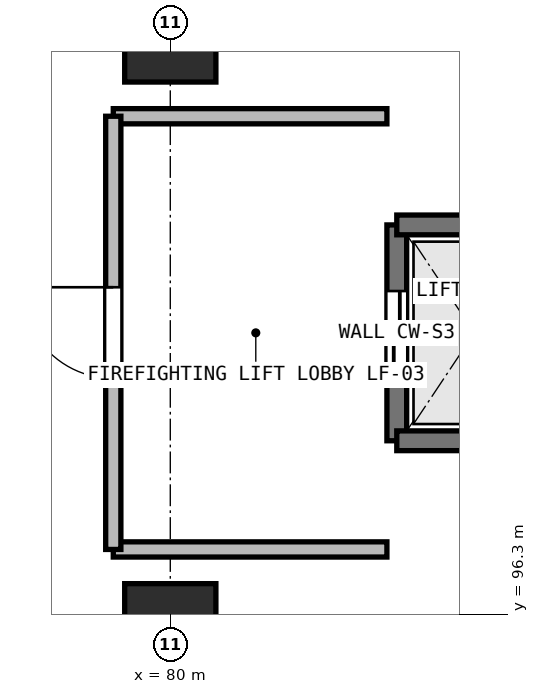
"""IFC4 building model, lengths in metres.
Left out: names, types, materials, properties, quantities, classifications, styles, units other than length and angle.
Written with IfcOpenShell. Run it as: python <this file> out.ifc"""

import sys

from ifc_helpers import new_model, si_unit, direction, frame, frame_2d, origin, origin_2d, place, context, subcontext, project, spatial, rectangle, extrude, element, fill, save


model = new_model("IFC4")
c1 = context("Model", 3, precision=1e-05, world=origin(), true_north=direction((0.0, 1.0)))
c2 = subcontext(c1, "Body", "Model", "MODEL_VIEW")
j1 = project(units=[si_unit("LENGTHUNIT", "METRE"), si_unit("PLANEANGLEUNIT", "RADIAN")], contexts=[c1])
p1 = place(None, origin())
s1 = spatial("IfcSite", under=j1, at=p1, CompositionType="ELEMENT")
p2 = place(p1, origin())
s2 = spatial("IfcBuilding", under=s1, at=p2, CompositionType="ELEMENT")
p3 = place(p2, origin())
s3 = spatial("IfcBuildingStorey", under=s2, at=p3, CompositionType="ELEMENT", Elevation=0.0)
for number, where, z_axis, x_axis in (
    (1, (80.0, 96.0, 0.0), (0.0, 0.0, 1.0), (1.0, 0.0, 0.0)),
    (2, (80.0, 104.0, 0.0), (0.0, 0.0, 1.0), (1.0, 0.0, 0.0)),
):
    element("IfcColumn", number, at=place(p3, frame(where, z_axis=z_axis, x_axis=x_axis)), inside=s3, PredefinedType="COLUMN", context=c2, shape_type="SweptSolid", body=[
        extrude(rectangle(XDim=1.2, YDim=1.4, at=origin_2d()), origin(), (0.0, 0.0, 1.0), 5.4),
    ])
p4 = place(p3, frame((82.98, 98.58, 0.0), z_axis=(0.0, 0.0, 1.0), x_axis=(0.0, 1.0, 0.0)))
e3 = element("IfcWall", 3, at=p4, inside=s3, PredefinedType="SHEAR", context=c2, shape_type="SweptSolid", body=[
    extrude(rectangle(XDim=2.84, YDim=0.26, at=frame_2d((1.42, 0.0))), origin(), (0.0, 0.0, 1.0), 5.08),
])
p5 = place(p4, frame((0.87, 0.0, 0.0)))
e4 = element("IfcOpeningElement", 4, at=p5, cuts=e3, PredefinedType="OPENING", context=c2, shape_type="SweptSolid", body=[
    extrude(rectangle(XDim=1.1, YDim=2.15, at=frame_2d((0.55, 1.075))), frame((0.0, 0.14, 0.0), z_axis=(0.0, -1.0, 0.0), x_axis=(1.0, 0.0, 0.0)), (0.0, 0.0, 1.0), 0.28),
])
for number, where, z_axis, x_axis in (
    (5, (82.98, 101.42, 0.0), (0.0, 0.0, 1.0), (1.0, 0.0, 0.0)),
    (6, (85.02, 98.58, 0.0), (0.0, 0.0, 1.0), (-1.0, 0.0, 0.0)),
):
    element("IfcWall", number, at=place(p3, frame(where, z_axis=z_axis, x_axis=x_axis)), inside=s3, PredefinedType="SHEAR", context=c2, shape_type="SweptSolid", body=[
        extrude(rectangle(XDim=2.04, YDim=0.26, at=frame_2d((1.02, 0.0))), origin(), (0.0, 0.0, 1.0), 5.08),
    ])
for number, where, z_axis, x_axis in (
    (7, (79.25, 102.85, 0.0), (0.0, 0.0, 1.0), (1.0, 0.0, 0.0)),
    (8, (82.85, 97.15, 0.0), (0.0, 0.0, 1.0), (-1.0, 0.0, 0.0)),
):
    element("IfcWall", number, at=place(p3, frame(where, z_axis=z_axis, x_axis=x_axis)), inside=s3, PredefinedType="PARTITIONING", context=c2, shape_type="SweptSolid", body=[
        extrude(rectangle(XDim=3.6, YDim=0.2, at=frame_2d((1.8, 0.0))), origin(), (0.0, 0.0, 1.0), 5.08),
    ])
p6 = place(p3, frame((79.25, 97.15, 0.0), z_axis=(0.0, 0.0, 1.0), x_axis=(0.0, 1.0, 0.0)))
e9 = element("IfcWall", 9, at=p6, inside=s3, PredefinedType="PARTITIONING", context=c2, shape_type="SweptSolid", body=[
    extrude(rectangle(XDim=5.7, YDim=0.2, at=frame_2d((2.85, 0.0))), origin(), (0.0, 0.0, 1.0), 4.05),
])
p7 = place(p6, frame((2.25, 0.0, 0.0)))
e10 = element("IfcOpeningElement", 10, at=p7, cuts=e9, PredefinedType="OPENING", context=c2, shape_type="SweptSolid", body=[
    extrude(rectangle(XDim=1.2, YDim=2.2, at=frame_2d((0.6, 1.1))), frame((0.0, 0.11, 0.0), z_axis=(0.0, -1.0, 0.0), x_axis=(1.0, 0.0, 0.0)), (0.0, 0.0, 1.0), 0.22),
])
p8 = place(p5, origin())
e11 = element("IfcDoor", 11, at=p8, inside=s3, OperationType="SLIDING_TO_LEFT", PredefinedType="DOOR", context=c2, shape_type="SweptSolid", body=[
    extrude(rectangle(XDim=1.1, YDim=2.15, at=frame_2d((0.55, 1.075))), frame((0.0, 0.025, 0.0), z_axis=(0.0, -1.0, 0.0), x_axis=(1.0, 0.0, 0.0)), (0.0, 0.0, 1.0), 0.05),
])
fill(e4, e11)
p9 = place(p7, origin())
e12 = element("IfcDoor", 12, at=p9, inside=s3, OperationType="SINGLE_SWING_RIGHT", PredefinedType="DOOR", context=c2, shape_type="SweptSolid", body=[
    extrude(rectangle(XDim=1.2, YDim=2.2, at=frame_2d((0.6, 1.1))), frame((0.0, 0.025, 0.0), z_axis=(0.0, -1.0, 0.0), x_axis=(1.0, 0.0, 0.0)), (0.0, 0.0, 1.0), 0.05),
])
fill(e10, e12)
save(model, sys.argv[1])
